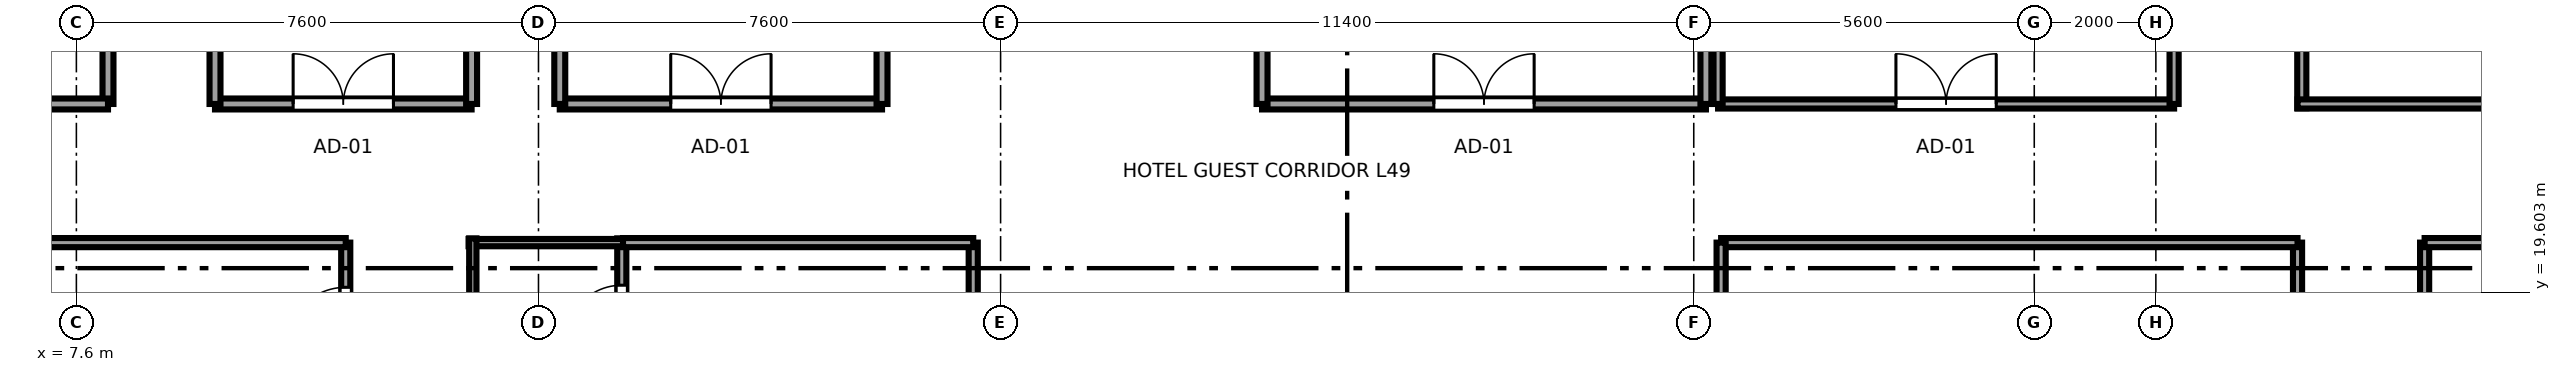
"""IFC4 building model, lengths in metres.
Left out: names, types, materials, properties, quantities, classifications, styles, units other than length and angle.
Written with IfcOpenShell. Run it as: python <this file> out.ifc"""

import sys

from ifc_helpers import new_model, si_unit, direction, frame, frame_2d, origin, place, context, subcontext, project, spatial, rectangle, extrude, source, transform, mapped, element, fill, save


model = new_model("IFC4")
c1 = context("Model", 3, precision=1e-05, world=origin(), true_north=direction((0.0, 1.0)))
c2 = subcontext(c1, "Body", "Model", "MODEL_VIEW")
j1 = project(units=[si_unit("LENGTHUNIT", "METRE"), si_unit("PLANEANGLEUNIT", "RADIAN")], contexts=[c1])
p1 = place(None, origin())
s1 = spatial("IfcSite", under=j1, at=p1, CompositionType="ELEMENT")
p2 = place(p1, origin())
s2 = spatial("IfcBuilding", under=s1, at=p2, CompositionType="ELEMENT")
p3 = place(p2, frame((0.0, 0.0, 187.55)))
s3 = spatial("IfcBuildingStorey", under=s2, at=p3, CompositionType="ELEMENT", Elevation=187.55)
p4 = place(p3, frame((16.57, 18.169, 0.0), z_axis=(0.0, 0.0, 1.0), x_axis=(0.0, 1.0, 0.0)))
e1 = element("IfcWall", 1, at=p4, inside=s3, PredefinedType="PARTITIONING", context=c2, shape_type="SweptSolid", body=[
    extrude(rectangle(XDim=2.321, YDim=0.15, at=frame_2d((1.161, 0.0))), origin(), (0.0, 0.0, 1.0), 3.37),
])
p5 = place(p4, frame((0.631, 0.0, 0.0)))
e2 = element("IfcOpeningElement", 2, at=p5, cuts=e1, PredefinedType="OPENING", context=c2, shape_type="SweptSolid", body=[
    extrude(rectangle(XDim=0.92, YDim=2.01, at=frame_2d((0.46, 1.005))), frame((0.0, 0.085, 0.0), z_axis=(0.0, -1.0, 0.0), x_axis=(1.0, 0.0, 0.0)), (0.0, 0.0, 1.0), 0.17),
])
p6 = place(p3, frame((14.05, 20.42, 0.0), z_axis=(0.0, 0.0, 1.0), x_axis=(1.0, 0.0, 0.0)))
e3 = element("IfcWall", 3, at=p6, inside=s3, PredefinedType="PLUMBINGWALL", context=c2, shape_type="SweptSolid", body=[
    extrude(rectangle(XDim=2.59, YDim=0.12, at=frame_2d((1.295, 0.0))), origin(), (0.0, 0.0, 1.0), 3.37),
])
p7 = place(p3, frame((14.12, 18.169, 0.0), z_axis=(0.0, 0.0, 1.0), x_axis=(0.0, 1.0, 0.0)))
e4 = element("IfcWall", 4, at=p7, inside=s3, PredefinedType="PLUMBINGWALL", context=c2, shape_type="SweptSolid", body=[
    extrude(rectangle(XDim=2.321, YDim=0.12, at=frame_2d((1.161, 0.0))), origin(), (0.0, 0.0, 1.0), 3.37),
])
p8 = place(p3, frame((12.03, 18.01, 0.0), z_axis=(0.0, 0.0, 1.0), x_axis=(0.0, 1.0, 0.0)))
e5 = element("IfcWall", 5, at=p8, inside=s3, PredefinedType="PARTITIONING", context=c2, shape_type="SweptSolid", body=[
    extrude(rectangle(XDim=2.41, YDim=0.15, at=frame_2d((1.205, 0.0))), origin(), (0.0, 0.0, 1.0), 3.37),
])
p9 = place(p8, frame((0.695, 0.0, 0.0)))
e6 = element("IfcOpeningElement", 6, at=p9, cuts=e5, PredefinedType="OPENING", context=c2, shape_type="SweptSolid", body=[
    extrude(rectangle(XDim=0.98, YDim=2.12, at=frame_2d((0.49, 1.06))), frame((0.0, 0.085, 0.0), z_axis=(0.0, -1.0, 0.0), x_axis=(1.0, 0.0, 0.0)), (0.0, 0.0, 1.0), 0.17),
])
p10 = place(p3, frame((3.005, 20.42, 0.0), z_axis=(0.0, 0.0, 1.0), x_axis=(1.0, 0.0, 0.0)))
e7 = element("IfcWall", 7, at=p10, inside=s3, PredefinedType="PARTITIONING", context=c2, shape_type="SweptSolid", body=[
    extrude(rectangle(XDim=9.025, YDim=0.15, at=frame_2d((4.513, 0.0))), origin(), (0.0, 0.0, 1.0), 3.37),
])
p11 = place(p3, frame((22.35, 14.68, 0.0), z_axis=(0.0, 0.0, 1.0), x_axis=(0.0, 1.0, 0.0)))
e8 = element("IfcWall", 8, at=p11, inside=s3, PredefinedType="PARTITIONING", context=c2, shape_type="SweptSolid", body=[
    extrude(rectangle(XDim=5.74, YDim=0.15, at=frame_2d((2.87, 0.0))), origin(), (0.0, 0.0, 1.0), 3.37),
])
p12 = place(p3, frame((16.59, 20.42, 0.0), z_axis=(0.0, 0.0, 1.0), x_axis=(1.0, 0.0, 0.0)))
e9 = element("IfcWall", 9, at=p12, inside=s3, PredefinedType="PARTITIONING", context=c2, shape_type="SweptSolid", body=[
    extrude(rectangle(XDim=5.76, YDim=0.15, at=frame_2d((2.88, 0.0))), origin(), (0.0, 0.0, 1.0), 3.37),
])
p13 = place(p3, frame((44.13, 14.21, 0.0), z_axis=(0.0, 0.0, 1.0), x_axis=(0.0, 1.0, 0.0)))
e10 = element("IfcWall", 10, at=p13, inside=s3, PredefinedType="PARTITIONING", context=c2, shape_type="SweptSolid", body=[
    extrude(rectangle(XDim=6.21, YDim=0.15, at=frame_2d((3.105, 0.0))), origin(), (0.0, 0.0, 1.0), 3.37),
])
p14 = place(p13, frame((2.595, 0.0, 0.0)))
e11 = element("IfcOpeningElement", 11, at=p14, cuts=e10, PredefinedType="OPENING", context=c2, shape_type="SweptSolid", body=[
    extrude(rectangle(XDim=0.98, YDim=2.12, at=frame_2d((0.49, 1.06))), frame((0.0, 0.085, 0.0), z_axis=(0.0, -1.0, 0.0), x_axis=(1.0, 0.0, 0.0)), (0.0, 0.0, 1.0), 0.17),
])
p15 = place(p3, frame((34.65, 20.42, 0.0), z_axis=(0.0, 0.0, 1.0), x_axis=(1.0, 0.0, 0.0)))
e12 = element("IfcWall", 12, at=p15, inside=s3, PredefinedType="PARTITIONING", context=c2, shape_type="SweptSolid", body=[
    extrude(rectangle(XDim=9.48, YDim=0.15, at=frame_2d((4.74, 0.0))), origin(), (0.0, 0.0, 1.0), 3.37),
])
p16 = place(p3, frame((34.65, 11.88, 0.0), z_axis=(0.0, 0.0, 1.0), x_axis=(0.0, 1.0, 0.0)))
e13 = element("IfcWall", 13, at=p16, inside=s3, PredefinedType="PARTITIONING", context=c2, shape_type="SweptSolid", body=[
    extrude(rectangle(XDim=8.54, YDim=0.15, at=frame_2d((4.27, 0.0))), origin(), (0.0, 0.0, 1.0), 3.37),
])
p17 = place(p3, frame((46.22, 16.941, 0.0), z_axis=(0.0, 0.0, 1.0), x_axis=(0.0, 1.0, 0.0)))
e14 = element("IfcWall", 14, at=p17, inside=s3, PredefinedType="PARTITIONING", context=c2, shape_type="SweptSolid", body=[
    extrude(rectangle(XDim=3.479, YDim=0.15, at=frame_2d((1.74, 0.0))), origin(), (0.0, 0.0, 1.0), 3.37),
])
p18 = place(p17, frame((1.229, 0.0, 0.0)))
e15 = element("IfcOpeningElement", 15, at=p18, cuts=e14, PredefinedType="OPENING", context=c2, shape_type="SweptSolid", body=[
    extrude(rectangle(XDim=0.98, YDim=2.12, at=frame_2d((0.49, 1.06))), frame((0.0, 0.085, 0.0), z_axis=(0.0, -1.0, 0.0), x_axis=(1.0, 0.0, 0.0)), (0.0, 0.0, 1.0), 0.17),
])
p19 = place(p3, frame((46.22, 20.42, 0.0), z_axis=(0.0, 0.0, 1.0), x_axis=(1.0, 0.0, 0.0)))
e16 = element("IfcWall", 16, at=p19, inside=s3, PredefinedType="PARTITIONING", context=c2, shape_type="SweptSolid", body=[
    extrude(rectangle(XDim=7.775, YDim=0.15, at=frame_2d((3.888, 0.0))), origin(), (0.0, 0.0, 1.0), 3.37),
])
p20 = place(p3, frame((8.12, 22.7, 0.0), z_axis=(0.0, 0.0, 1.0), x_axis=(0.0, 1.0, 0.0)))
e17 = element("IfcWall", 17, at=p20, inside=s3, PredefinedType="PARTITIONING", context=c2, shape_type="SweptSolid", body=[
    extrude(rectangle(XDim=13.1, YDim=0.18, at=frame_2d((6.55, 0.0))), origin(), (0.0, 0.0, 1.0), 3.37),
])
p21 = place(p20, frame((3.35, 0.0, 0.0)))
e18 = element("IfcOpeningElement", 18, at=p21, cuts=e17, PredefinedType="OPENING", context=c2, shape_type="SweptSolid", body=[
    extrude(rectangle(XDim=1.65, YDim=2.15, at=frame_2d((0.825, 1.075))), frame((0.0, 0.1, 0.0), z_axis=(0.0, -1.0, 0.0), x_axis=(1.0, 0.0, 0.0)), (0.0, 0.0, 1.0), 0.2),
])
p22 = place(p3, frame((3.005, 22.7, 0.0), z_axis=(0.0, 0.0, 1.0), x_axis=(1.0, 0.0, 0.0)))
e19 = element("IfcWall", 19, at=p22, inside=s3, PredefinedType="PARTITIONING", context=c2, shape_type="SweptSolid", body=[
    extrude(rectangle(XDim=5.115, YDim=0.18, at=frame_2d((2.558, 0.0))), origin(), (0.0, 0.0, 1.0), 3.37),
])
p23 = place(p3, frame((44.2, 22.63, 0.0), z_axis=(0.0, 0.0, 1.0), x_axis=(0.0, 1.0, 0.0)))
e20 = element("IfcWall", 20, at=p23, inside=s3, PredefinedType="PARTITIONING", context=c2, shape_type="SweptSolid", body=[
    extrude(rectangle(XDim=3.74, YDim=0.15, at=frame_2d((1.87, 0.0))), origin(), (0.0, 0.0, 1.0), 3.37),
])
p24 = place(p23, frame((1.24, 0.0, 0.0)))
e21 = element("IfcOpeningElement", 21, at=p24, cuts=e20, PredefinedType="OPENING", context=c2, shape_type="SweptSolid", body=[
    extrude(rectangle(XDim=0.92, YDim=2.01, at=frame_2d((0.46, 1.005))), frame((0.0, 0.085, 0.0), z_axis=(0.0, -1.0, 0.0), x_axis=(1.0, 0.0, 0.0)), (0.0, 0.0, 1.0), 0.17),
])
p25 = place(p3, frame((44.13, 22.7, 0.0), z_axis=(0.0, 0.0, 1.0), x_axis=(1.0, 0.0, 0.0)))
e22 = element("IfcWall", 22, at=p25, inside=s3, PredefinedType="PARTITIONING", context=c2, shape_type="SweptSolid", body=[
    extrude(rectangle(XDim=4.54, YDim=0.15, at=frame_2d((2.27, 0.0))), origin(), (0.0, 0.0, 1.0), 3.37),
])
p26 = place(p3, frame((9.88, 22.7, 0.0), z_axis=(0.0, 0.0, 1.0), x_axis=(1.0, 0.0, 0.0)))
e23 = element("IfcWall", 23, at=p26, inside=s3, PredefinedType="PARTITIONING", context=c2, shape_type="SweptSolid", body=[
    extrude(rectangle(XDim=4.22, YDim=0.18, at=frame_2d((2.11, 0.0))), origin(), (0.0, 0.0, 1.0), 3.37),
])
p27 = place(p26, frame((1.285, 0.0, 0.0)))
e24 = element("IfcOpeningElement", 24, at=p27, cuts=e23, PredefinedType="OPENING", context=c2, shape_type="SweptSolid", body=[
    extrude(rectangle(XDim=1.65, YDim=2.15, at=frame_2d((0.825, 1.075))), frame((0.0, 0.1, 0.0), z_axis=(0.0, -1.0, 0.0), x_axis=(1.0, 0.0, 0.0)), (0.0, 0.0, 1.0), 0.2),
])
for number, where, z_axis, x_axis in (
    (25, (9.88, 22.7, 0.0), (0.0, 0.0, 1.0), (0.0, 1.0, 0.0)),
    (26, (14.1, 22.7, 0.0), (0.0, 0.0, 1.0), (0.0, 1.0, 0.0)),
):
    element("IfcWall", number, at=place(p3, frame(where, z_axis=z_axis, x_axis=x_axis)), inside=s3, PredefinedType="PARTITIONING", context=c2, shape_type="SweptSolid", body=[
        extrude(rectangle(XDim=7.05, YDim=0.18, at=frame_2d((3.525, 0.0))), origin(), (0.0, 0.0, 1.0), 3.37),
    ])
p28 = place(p3, frame((27.1, 22.7, 0.0), z_axis=(0.0, 0.0, 1.0), x_axis=(1.0, 0.0, 0.0)))
e27 = element("IfcWall", 27, at=p28, inside=s3, PredefinedType="PARTITIONING", context=c2, shape_type="SweptSolid", body=[
    extrude(rectangle(XDim=7.3, YDim=0.18, at=frame_2d((3.65, 0.0))), origin(), (0.0, 0.0, 1.0), 3.37),
])
p29 = place(p28, frame((2.825, 0.0, 0.0)))
e28 = element("IfcOpeningElement", 28, at=p29, cuts=e27, PredefinedType="OPENING", context=c2, shape_type="SweptSolid", body=[
    extrude(rectangle(XDim=1.65, YDim=2.15, at=frame_2d((0.825, 1.075))), frame((0.0, 0.1, 0.0), z_axis=(0.0, -1.0, 0.0), x_axis=(1.0, 0.0, 0.0)), (0.0, 0.0, 1.0), 0.2),
])
for number, where, z_axis, x_axis in (
    (29, (27.1, 22.7, 0.0), (0.0, 0.0, 1.0), (0.0, 1.0, 0.0)),
    (30, (34.4, 22.7, 0.0), (0.0, 0.0, 1.0), (0.0, 1.0, 0.0)),
):
    element("IfcWall", number, at=place(p3, frame(where, z_axis=z_axis, x_axis=x_axis)), inside=s3, PredefinedType="PARTITIONING", context=c2, shape_type="SweptSolid", body=[
        extrude(rectangle(XDim=7.1, YDim=0.18, at=frame_2d((3.55, 0.0))), origin(), (0.0, 0.0, 1.0), 3.37),
    ])
p30 = place(p3, frame((15.55, 22.7, 0.0), z_axis=(0.0, 0.0, 1.0), x_axis=(1.0, 0.0, 0.0)))
e31 = element("IfcWall", 31, at=p30, inside=s3, PredefinedType="PARTITIONING", context=c2, shape_type="SweptSolid", body=[
    extrude(rectangle(XDim=5.3, YDim=0.18, at=frame_2d((2.65, 0.0))), origin(), (0.0, 0.0, 1.0), 3.37),
])
p31 = place(p30, frame((1.825, 0.0, 0.0)))
e32 = element("IfcOpeningElement", 32, at=p31, cuts=e31, PredefinedType="OPENING", context=c2, shape_type="SweptSolid", body=[
    extrude(rectangle(XDim=1.65, YDim=2.15, at=frame_2d((0.825, 1.075))), frame((0.0, 0.1, 0.0), z_axis=(0.0, -1.0, 0.0), x_axis=(1.0, 0.0, 0.0)), (0.0, 0.0, 1.0), 0.2),
])
for number, where, z_axis, x_axis in (
    (33, (15.55, 22.7, 0.0), (0.0, 0.0, 1.0), (0.0, 1.0, 0.0)),
    (34, (20.85, 22.7, 0.0), (0.0, 0.0, 1.0), (0.0, 1.0, 0.0)),
):
    element("IfcWall", number, at=place(p3, frame(where, z_axis=z_axis, x_axis=x_axis)), inside=s3, PredefinedType="PARTITIONING", context=c2, shape_type="SweptSolid", body=[
        extrude(rectangle(XDim=7.1, YDim=0.18, at=frame_2d((3.55, 0.0))), origin(), (0.0, 0.0, 1.0), 3.37),
    ])
p32 = place(p3, frame((34.6, 22.7, 0.0), z_axis=(0.0, 0.0, 1.0), x_axis=(1.0, 0.0, 0.0)))
e35 = element("IfcWall", 35, at=p32, inside=s3, PredefinedType="PARTITIONING", context=c2, shape_type="SweptSolid", body=[
    extrude(rectangle(XDim=7.5, YDim=0.15, at=frame_2d((3.75, 0.0))), origin(), (0.0, 0.0, 1.0), 3.37),
])
p33 = place(p32, frame((2.925, 0.0, 0.0)))
e36 = element("IfcOpeningElement", 36, at=p33, cuts=e35, PredefinedType="OPENING", context=c2, shape_type="SweptSolid", body=[
    extrude(rectangle(XDim=1.65, YDim=2.15, at=frame_2d((0.825, 1.075))), frame((0.0, 0.085, 0.0), z_axis=(0.0, -1.0, 0.0), x_axis=(1.0, 0.0, 0.0)), (0.0, 0.0, 1.0), 0.17),
])
p34 = place(p3, frame((34.6, 22.7, 0.0), z_axis=(0.0, 0.0, 1.0), x_axis=(0.0, 1.0, 0.0)))
e37 = element("IfcWall", 37, at=p34, inside=s3, PredefinedType="PARTITIONING", context=c2, shape_type="SweptSolid", body=[
    extrude(rectangle(XDim=6.7, YDim=0.15, at=frame_2d((3.35, 0.0))), origin(), (0.0, 0.0, 1.0), 3.37),
])
p35 = place(p3, frame((42.1, 22.7, 0.0), z_axis=(0.0, 0.0, 1.0), x_axis=(0.0, 1.0, 0.0)))
e38 = element("IfcWall", 38, at=p35, inside=s3, PredefinedType="PARTITIONING", context=c2, shape_type="SweptSolid", body=[
    extrude(rectangle(XDim=6.7, YDim=0.15, at=frame_2d((3.35, 0.0))), origin(), (0.0, 0.0, 1.0), 2.16),
])
m1 = source(origin(), c2, "Body", "SweptSolid", [
    extrude(rectangle(XDim=0.92, YDim=2.01, at=frame_2d((0.46, 1.005))), frame((0.0, 0.025, 0.0), z_axis=(0.0, -1.0, 0.0), x_axis=(1.0, 0.0, 0.0)), (0.0, 0.0, 1.0), 0.05),
])
p36 = place(p5, origin())
e39 = element("IfcDoor", 39, at=p36, inside=s3, OperationType="SINGLE_SWING_LEFT", PredefinedType="DOOR", context=c2, shape_type="MappedRepresentation", body=[
    mapped(m1, transform((0.0, 0.0, 0.0), x_axis=(1.0, 0.0, 0.0), y_axis=(0.0, 1.0, 0.0), z_axis=(0.0, 0.0, 1.0), scale=1.0)),
])
fill(e2, e39)
m2 = source(origin(), c2, "Body", "SweptSolid", [
    extrude(rectangle(XDim=0.98, YDim=2.12, at=frame_2d((0.49, 1.06))), frame((0.0, 0.025, 0.0), z_axis=(0.0, -1.0, 0.0), x_axis=(1.0, 0.0, 0.0)), (0.0, 0.0, 1.0), 0.05),
])
p37 = place(p9, origin())
e40 = element("IfcDoor", 40, at=p37, inside=s3, OperationType="SINGLE_SWING_LEFT", PredefinedType="DOOR", context=c2, shape_type="MappedRepresentation", body=[
    mapped(m2, transform((0.0, 0.0, 0.0), x_axis=(1.0, 0.0, 0.0), y_axis=(0.0, 1.0, 0.0), z_axis=(0.0, 0.0, 1.0), scale=1.0)),
])
fill(e6, e40)
m3 = source(origin(), c2, "Body", "SweptSolid", [
    extrude(rectangle(XDim=1.65, YDim=2.15, at=frame_2d((0.825, 1.075))), frame((0.0, 0.025, 0.0), z_axis=(0.0, -1.0, 0.0), x_axis=(1.0, 0.0, 0.0)), (0.0, 0.0, 1.0), 0.05),
])
p38 = place(p27, origin())
e41 = element("IfcDoor", 41, at=p38, inside=s3, OperationType="DOUBLE_DOOR_SINGLE_SWING", PredefinedType="DOOR", context=c2, shape_type="MappedRepresentation", body=[
    mapped(m3, transform((0.0, 0.0, 0.0), x_axis=(1.0, 0.0, 0.0), y_axis=(0.0, 1.0, 0.0), z_axis=(0.0, 0.0, 1.0), scale=1.0)),
])
fill(e24, e41)
p39 = place(p29, origin())
e42 = element("IfcDoor", 42, at=p39, inside=s3, OperationType="DOUBLE_DOOR_SINGLE_SWING", PredefinedType="DOOR", context=c2, shape_type="MappedRepresentation", body=[
    mapped(m3, transform((0.0, 0.0, 0.0), x_axis=(1.0, 0.0, 0.0), y_axis=(0.0, 1.0, 0.0), z_axis=(0.0, 0.0, 1.0), scale=1.0)),
])
fill(e28, e42)
p40 = place(p31, origin())
e43 = element("IfcDoor", 43, at=p40, inside=s3, OperationType="DOUBLE_DOOR_SINGLE_SWING", PredefinedType="DOOR", context=c2, shape_type="MappedRepresentation", body=[
    mapped(m3, transform((0.0, 0.0, 0.0), x_axis=(1.0, 0.0, 0.0), y_axis=(0.0, 1.0, 0.0), z_axis=(0.0, 0.0, 1.0), scale=1.0)),
])
fill(e32, e43)
p41 = place(p33, origin())
e44 = element("IfcDoor", 44, at=p41, inside=s3, OperationType="DOUBLE_DOOR_SINGLE_SWING", PredefinedType="DOOR", context=c2, shape_type="MappedRepresentation", body=[
    mapped(m3, transform((0.0, 0.0, 0.0), x_axis=(1.0, 0.0, 0.0), y_axis=(0.0, 1.0, 0.0), z_axis=(0.0, 0.0, 1.0), scale=1.0)),
])
fill(e36, e44)
save(model, sys.argv[1])
